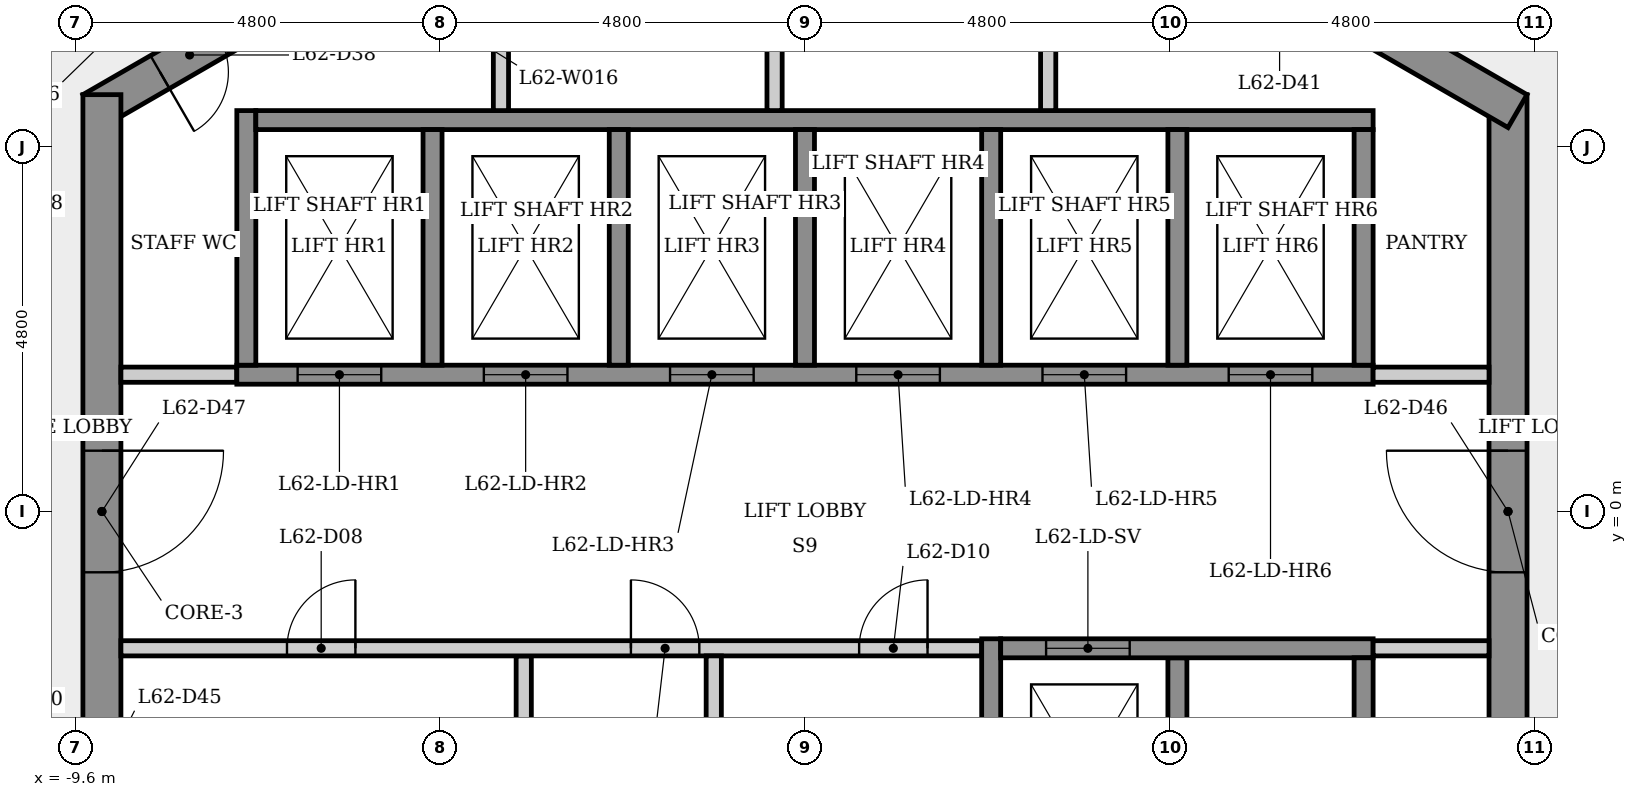
"""IFC4 building model, lengths in metres.
Left out: names, types, materials, properties, quantities, classifications, styles, units other than length and angle.
Written with IfcOpenShell. Run it as: python <this file> out.ifc"""

import sys

from ifc_helpers import new_model, si_unit, direction, frame, frame_2d, origin, place, context, subcontext, project, spatial, rectangle, extrude, element, fill, save


model = new_model("IFC4")
c1 = context("Model", 3, precision=1e-05, world=origin(), true_north=direction((0.0, 1.0)))
c2 = subcontext(c1, "Body", "Model", "MODEL_VIEW")
j1 = project(units=[si_unit("LENGTHUNIT", "METRE"), si_unit("PLANEANGLEUNIT", "RADIAN")], contexts=[c1])
p1 = place(None, origin())
s1 = spatial("IfcSite", under=j1, at=p1, CompositionType="ELEMENT")
p2 = place(p1, origin())
s2 = spatial("IfcBuilding", under=s1, at=p2, CompositionType="ELEMENT")
p3 = place(p2, frame((0.0, 0.0, 232.5)))
s3 = spatial("IfcBuildingStorey", under=s2, at=p3, CompositionType="ELEMENT", Elevation=232.5)
p4 = place(p3, frame((9.25, -5.485, 0.0), z_axis=(0.0, 0.0, 1.0), x_axis=(0.0, 1.0, 0.0)))
e1 = element("IfcWall", 1, at=p4, inside=s3, PredefinedType="SHEAR", context=c2, shape_type="SweptSolid", body=[
    extrude(rectangle(XDim=10.97, YDim=0.5, at=frame_2d((5.485, 0.0))), origin(), (0.0, 0.0, 1.0), 3.4),
])
p5 = place(p4, frame((4.685, 0.0, 0.0)))
e2 = element("IfcOpeningElement", 2, at=p5, cuts=e1, PredefinedType="OPENING", context=c2, shape_type="SweptSolid", body=[
    extrude(rectangle(XDim=1.6, YDim=2.1, at=frame_2d((0.8, 1.05))), frame((0.0, 0.26, 0.0), z_axis=(0.0, -1.0, 0.0), x_axis=(1.0, 0.0, 0.0)), (0.0, 0.0, 1.0), 0.52),
])
p6 = place(p3, frame((9.375, 5.268, 0.0), z_axis=(0.0, 0.0, 1.0), x_axis=(-0.866023993627, 0.500002442456, 0.0)))
e3 = element("IfcWall", 3, at=p6, inside=s3, PredefinedType="SHEAR", context=c2, shape_type="SweptSolid", body=[
    extrude(rectangle(XDim=10.97, YDim=0.5, at=frame_2d((5.485, 0.0))), origin(), (0.0, 0.0, 1.0), 3.4),
])
p7 = place(p6, frame((8.383, 0.0, 0.0)))
e4 = element("IfcOpeningElement", 4, at=p7, cuts=e3, PredefinedType="OPENING", context=c2, shape_type="SweptSolid", body=[
    extrude(rectangle(XDim=0.9, YDim=2.1, at=frame_2d((0.45, 1.05))), frame((0.0, 0.26, 0.0), z_axis=(0.0, -1.0, 0.0), x_axis=(1.0, 0.0, 0.0)), (0.0, 0.0, 1.0), 0.52),
])
p8 = place(p6, frame((3.165, 0.0, 0.0)))
e5 = element("IfcOpeningElement", 5, at=p8, cuts=e3, PredefinedType="OPENING", context=c2, shape_type="SweptSolid", body=[
    extrude(rectangle(XDim=0.9, YDim=2.1, at=frame_2d((0.45, 1.05))), frame((0.0, 0.26, 0.0), z_axis=(0.0, -1.0, 0.0), x_axis=(1.0, 0.0, 0.0)), (0.0, 0.0, 1.0), 0.52),
])
p9 = place(p3, frame((0.125, 10.753, 0.0), z_axis=(0.0, 0.0, 1.0), x_axis=(-0.866023993627, -0.500002442456, 0.0)))
e6 = element("IfcWall", 6, at=p9, inside=s3, PredefinedType="SHEAR", context=c2, shape_type="SweptSolid", body=[
    extrude(rectangle(XDim=10.97, YDim=0.5, at=frame_2d((5.485, 0.0))), origin(), (0.0, 0.0, 1.0), 3.4),
])
p10 = place(p9, frame((9.043, 0.0, 0.0)))
e7 = element("IfcOpeningElement", 7, at=p10, cuts=e6, PredefinedType="OPENING", context=c2, shape_type="SweptSolid", body=[
    extrude(rectangle(XDim=0.9, YDim=2.1, at=frame_2d((0.45, 1.05))), frame((0.0, 0.26, 0.0), z_axis=(0.0, -1.0, 0.0), x_axis=(1.0, 0.0, 0.0)), (0.0, 0.0, 1.0), 0.52),
])
p11 = place(p9, frame((2.38, 0.0, 0.0)))
e8 = element("IfcOpeningElement", 8, at=p11, cuts=e6, PredefinedType="OPENING", context=c2, shape_type="SweptSolid", body=[
    extrude(rectangle(XDim=0.9, YDim=2.1, at=frame_2d((0.45, 1.05))), frame((0.0, 0.26, 0.0), z_axis=(0.0, -1.0, 0.0), x_axis=(1.0, 0.0, 0.0)), (0.0, 0.0, 1.0), 0.52),
])
p12 = place(p3, frame((-9.25, 5.485, 0.0), z_axis=(0.0, 0.0, 1.0), x_axis=(0.0, -1.0, 0.0)))
e9 = element("IfcWall", 9, at=p12, inside=s3, PredefinedType="SHEAR", context=c2, shape_type="SweptSolid", body=[
    extrude(rectangle(XDim=10.97, YDim=0.5, at=frame_2d((5.485, 0.0))), origin(), (0.0, 0.0, 1.0), 3.4),
])
p13 = place(p12, frame((8.51, 0.0, 0.0)))
e10 = element("IfcOpeningElement", 10, at=p13, cuts=e9, PredefinedType="OPENING", context=c2, shape_type="SweptSolid", body=[
    extrude(rectangle(XDim=0.9, YDim=2.1, at=frame_2d((0.45, 1.05))), frame((0.0, 0.26, 0.0), z_axis=(0.0, -1.0, 0.0), x_axis=(1.0, 0.0, 0.0)), (0.0, 0.0, 1.0), 0.52),
])
p14 = place(p12, frame((4.685, 0.0, 0.0)))
e11 = element("IfcOpeningElement", 11, at=p14, cuts=e9, PredefinedType="OPENING", context=c2, shape_type="SweptSolid", body=[
    extrude(rectangle(XDim=1.6, YDim=2.1, at=frame_2d((0.8, 1.05))), frame((0.0, 0.26, 0.0), z_axis=(0.0, -1.0, 0.0), x_axis=(1.0, 0.0, 0.0)), (0.0, 0.0, 1.0), 0.52),
])
p15 = place(p3, frame((-9.0, 1.8, 0.0), z_axis=(0.0, 0.0, 1.0), x_axis=(1.0, 0.0, 0.0)))
e12 = element("IfcWall", 12, at=p15, inside=s3, PredefinedType="PARTITIONING", context=c2, shape_type="SweptSolid", body=[
    extrude(rectangle(XDim=1.525, YDim=0.2, at=frame_2d((0.763, 0.0))), origin(), (0.0, 0.0, 1.0), 3.05),
])
p16 = place(p3, frame((-7.475, 1.8, 0.0), z_axis=(0.0, 0.0, 1.0), x_axis=(1.0, 0.0, 0.0)))
e13 = element("IfcWall", 13, at=p16, inside=s3, PredefinedType="SHEAR", context=c2, shape_type="SweptSolid", body=[
    extrude(rectangle(XDim=14.95, YDim=0.25, at=frame_2d((7.475, 0.0))), origin(), (0.0, 0.0, 1.0), 3.05),
])
p17 = place(p16, frame((0.8, 0.0, 0.0)))
e14 = element("IfcOpeningElement", 14, at=p17, cuts=e13, PredefinedType="OPENING", context=c2, shape_type="SweptSolid", body=[
    extrude(rectangle(XDim=1.1, YDim=2.1, at=frame_2d((0.55, 1.05))), frame((0.0, 0.135, 0.0), z_axis=(0.0, -1.0, 0.0), x_axis=(1.0, 0.0, 0.0)), (0.0, 0.0, 1.0), 0.27),
])
p18 = place(p16, frame((3.25, 0.0, 0.0)))
e15 = element("IfcOpeningElement", 15, at=p18, cuts=e13, PredefinedType="OPENING", context=c2, shape_type="SweptSolid", body=[
    extrude(rectangle(XDim=1.1, YDim=2.1, at=frame_2d((0.55, 1.05))), frame((0.0, 0.135, 0.0), z_axis=(0.0, -1.0, 0.0), x_axis=(1.0, 0.0, 0.0)), (0.0, 0.0, 1.0), 0.27),
])
p19 = place(p16, frame((5.7, 0.0, 0.0)))
e16 = element("IfcOpeningElement", 16, at=p19, cuts=e13, PredefinedType="OPENING", context=c2, shape_type="SweptSolid", body=[
    extrude(rectangle(XDim=1.1, YDim=2.1, at=frame_2d((0.55, 1.05))), frame((0.0, 0.135, 0.0), z_axis=(0.0, -1.0, 0.0), x_axis=(1.0, 0.0, 0.0)), (0.0, 0.0, 1.0), 0.27),
])
p20 = place(p16, frame((8.15, 0.0, 0.0)))
e17 = element("IfcOpeningElement", 17, at=p20, cuts=e13, PredefinedType="OPENING", context=c2, shape_type="SweptSolid", body=[
    extrude(rectangle(XDim=1.1, YDim=2.1, at=frame_2d((0.55, 1.05))), frame((0.0, 0.135, 0.0), z_axis=(0.0, -1.0, 0.0), x_axis=(1.0, 0.0, 0.0)), (0.0, 0.0, 1.0), 0.27),
])
p21 = place(p16, frame((10.6, 0.0, 0.0)))
e18 = element("IfcOpeningElement", 18, at=p21, cuts=e13, PredefinedType="OPENING", context=c2, shape_type="SweptSolid", body=[
    extrude(rectangle(XDim=1.1, YDim=2.1, at=frame_2d((0.55, 1.05))), frame((0.0, 0.135, 0.0), z_axis=(0.0, -1.0, 0.0), x_axis=(1.0, 0.0, 0.0)), (0.0, 0.0, 1.0), 0.27),
])
p22 = place(p16, frame((13.05, 0.0, 0.0)))
e19 = element("IfcOpeningElement", 19, at=p22, cuts=e13, PredefinedType="OPENING", context=c2, shape_type="SweptSolid", body=[
    extrude(rectangle(XDim=1.1, YDim=2.1, at=frame_2d((0.55, 1.05))), frame((0.0, 0.135, 0.0), z_axis=(0.0, -1.0, 0.0), x_axis=(1.0, 0.0, 0.0)), (0.0, 0.0, 1.0), 0.27),
])
p23 = place(p3, frame((-7.35, 1.925, 0.0), z_axis=(0.0, 0.0, 1.0), x_axis=(0.0, 1.0, 0.0)))
e20 = element("IfcWall", 20, at=p23, inside=s3, PredefinedType="SHEAR", context=c2, shape_type="SweptSolid", body=[
    extrude(rectangle(XDim=3.35, YDim=0.25, at=frame_2d((1.675, 0.0))), origin(), (0.0, 0.0, 1.0), 3.05),
])
p24 = place(p3, frame((-7.225, 5.15, 0.0), z_axis=(0.0, 0.0, 1.0), x_axis=(1.0, 0.0, 0.0)))
e21 = element("IfcWall", 21, at=p24, inside=s3, PredefinedType="SHEAR", context=c2, shape_type="SweptSolid", body=[
    extrude(rectangle(XDim=14.7, YDim=0.25, at=frame_2d((7.35, 0.0))), origin(), (0.0, 0.0, 1.0), 3.05),
])
p25 = place(p3, frame((-4.9, 5.025, 0.0), z_axis=(0.0, 0.0, 1.0), x_axis=(0.0, -1.0, 0.0)))
e22 = element("IfcWall", 22, at=p25, inside=s3, PredefinedType="SHEAR", context=c2, shape_type="SweptSolid", body=[
    extrude(rectangle(XDim=3.1, YDim=0.25, at=frame_2d((1.55, 0.0))), origin(), (0.0, 0.0, 1.0), 3.4),
])
p26 = place(p3, frame((-4.0, 8.083, 0.0), z_axis=(0.0, 0.0, 1.0), x_axis=(0.0, -1.0, 0.0)))
e23 = element("IfcWall", 23, at=p26, inside=s3, PredefinedType="PARTITIONING", context=c2, shape_type="SweptSolid", body=[
    extrude(rectangle(XDim=2.808, YDim=0.2, at=frame_2d((1.404, 0.0))), origin(), (0.0, 0.0, 1.0), 3.05),
])
p27 = place(p3, frame((-3.7, -1.9, 0.0), z_axis=(0.0, 0.0, 1.0), x_axis=(0.0, -1.0, 0.0)))
e24 = element("IfcWall", 24, at=p27, inside=s3, PredefinedType="PARTITIONING", context=c2, shape_type="SweptSolid", body=[
    extrude(rectangle(XDim=3.15, YDim=0.2, at=frame_2d((1.575, 0.0))), origin(), (0.0, 0.0, 1.0), 3.05),
])
p28 = place(p3, frame((-9.0, -1.8, 0.0), z_axis=(0.0, 0.0, 1.0), x_axis=(1.0, 0.0, 0.0)))
e25 = element("IfcWall", 25, at=p28, inside=s3, PredefinedType="PARTITIONING", context=c2, shape_type="SweptSolid", body=[
    extrude(rectangle(XDim=11.325, YDim=0.2, at=frame_2d((5.663, 0.0))), origin(), (0.0, 0.0, 1.0), 3.05),
])
p29 = place(p28, frame((2.185, 0.0, 0.0)))
e26 = element("IfcOpeningElement", 26, at=p29, cuts=e25, PredefinedType="OPENING", context=c2, shape_type="SweptSolid", body=[
    extrude(rectangle(XDim=0.9, YDim=2.1, at=frame_2d((0.45, 1.05))), frame((0.0, 0.11, 0.0), z_axis=(0.0, -1.0, 0.0), x_axis=(1.0, 0.0, 0.0)), (0.0, 0.0, 1.0), 0.22),
])
p30 = place(p28, frame((6.71, 0.0, 0.0)))
e27 = element("IfcOpeningElement", 27, at=p30, cuts=e25, PredefinedType="OPENING", context=c2, shape_type="SweptSolid", body=[
    extrude(rectangle(XDim=0.9, YDim=2.1, at=frame_2d((0.45, 1.05))), frame((0.0, 0.11, 0.0), z_axis=(0.0, -1.0, 0.0), x_axis=(1.0, 0.0, 0.0)), (0.0, 0.0, 1.0), 0.22),
])
p31 = place(p28, frame((9.713, 0.0, 0.0)))
e28 = element("IfcOpeningElement", 28, at=p31, cuts=e25, PredefinedType="OPENING", context=c2, shape_type="SweptSolid", body=[
    extrude(rectangle(XDim=0.9, YDim=2.1, at=frame_2d((0.45, 1.05))), frame((0.0, 0.11, 0.0), z_axis=(0.0, -1.0, 0.0), x_axis=(1.0, 0.0, 0.0)), (0.0, 0.0, 1.0), 0.22),
])
p32 = place(p3, frame((-2.45, 5.025, 0.0), z_axis=(0.0, 0.0, 1.0), x_axis=(0.0, -1.0, 0.0)))
e29 = element("IfcWall", 29, at=p32, inside=s3, PredefinedType="SHEAR", context=c2, shape_type="SweptSolid", body=[
    extrude(rectangle(XDim=3.1, YDim=0.25, at=frame_2d((1.55, 0.0))), origin(), (0.0, 0.0, 1.0), 3.4),
])
p33 = place(p3, frame((-1.2, -1.9, 0.0), z_axis=(0.0, 0.0, 1.0), x_axis=(0.0, -1.0, 0.0)))
e30 = element("IfcWall", 30, at=p33, inside=s3, PredefinedType="PARTITIONING", context=c2, shape_type="SweptSolid", body=[
    extrude(rectangle(XDim=3.15, YDim=0.2, at=frame_2d((1.575, 0.0))), origin(), (0.0, 0.0, 1.0), 3.05),
])
p34 = place(p3, frame((-0.4, 10.161, 0.0), z_axis=(0.0, 0.0, 1.0), x_axis=(0.0, -1.0, 0.0)))
e31 = element("IfcWall", 31, at=p34, inside=s3, PredefinedType="PARTITIONING", context=c2, shape_type="SweptSolid", body=[
    extrude(rectangle(XDim=4.886, YDim=0.2, at=frame_2d((2.443, 0.0))), origin(), (0.0, 0.0, 1.0), 3.05),
])
p35 = place(p3, frame((0.0, 5.025, 0.0), z_axis=(0.0, 0.0, 1.0), x_axis=(0.0, -1.0, 0.0)))
e32 = element("IfcWall", 32, at=p35, inside=s3, PredefinedType="SHEAR", context=c2, shape_type="SweptSolid", body=[
    extrude(rectangle(XDim=3.1, YDim=0.25, at=frame_2d((1.55, 0.0))), origin(), (0.0, 0.0, 1.0), 3.4),
])
p36 = place(p3, frame((2.45, -5.275, 0.0), z_axis=(0.0, 0.0, 1.0), x_axis=(0.0, 1.0, 0.0)))
e33 = element("IfcWall", 33, at=p36, inside=s3, PredefinedType="SHEAR", context=c2, shape_type="SweptSolid", body=[
    extrude(rectangle(XDim=3.6, YDim=0.25, at=frame_2d((1.8, 0.0))), origin(), (0.0, 0.0, 1.0), 3.05),
])
p37 = place(p3, frame((2.45, 5.025, 0.0), z_axis=(0.0, 0.0, 1.0), x_axis=(0.0, -1.0, 0.0)))
e34 = element("IfcWall", 34, at=p37, inside=s3, PredefinedType="SHEAR", context=c2, shape_type="SweptSolid", body=[
    extrude(rectangle(XDim=3.1, YDim=0.25, at=frame_2d((1.55, 0.0))), origin(), (0.0, 0.0, 1.0), 3.4),
])
p38 = place(p3, frame((3.2, 8.545, 0.0), z_axis=(0.0, 0.0, 1.0), x_axis=(0.0, -1.0, 0.0)))
e35 = element("IfcWall", 35, at=p38, inside=s3, PredefinedType="PARTITIONING", context=c2, shape_type="SweptSolid", body=[
    extrude(rectangle(XDim=3.27, YDim=0.2, at=frame_2d((1.635, 0.0))), origin(), (0.0, 0.0, 1.0), 3.05),
])
for number, where, z_axis, x_axis in (
    (36, (4.9, -1.925, 0.0), (0.0, 0.0, 1.0), (0.0, -1.0, 0.0)),
    (37, (4.9, 5.025, 0.0), (0.0, 0.0, 1.0), (0.0, -1.0, 0.0)),
):
    element("IfcWall", number, at=place(p3, frame(where, z_axis=z_axis, x_axis=x_axis)), inside=s3, PredefinedType="SHEAR", context=c2, shape_type="SweptSolid", body=[
        extrude(rectangle(XDim=3.1, YDim=0.25, at=frame_2d((1.55, 0.0))), origin(), (0.0, 0.0, 1.0), 3.4),
    ])
p39 = place(p3, frame((2.575, -1.8, 0.0), z_axis=(0.0, 0.0, 1.0), x_axis=(1.0, 0.0, 0.0)))
e38 = element("IfcWall", 38, at=p39, inside=s3, PredefinedType="SHEAR", context=c2, shape_type="SweptSolid", body=[
    extrude(rectangle(XDim=4.9, YDim=0.25, at=frame_2d((2.45, 0.0))), origin(), (0.0, 0.0, 1.0), 3.05),
])
p40 = place(p39, frame((0.597, 0.0, 0.0)))
e39 = element("IfcOpeningElement", 39, at=p40, cuts=e38, PredefinedType="OPENING", context=c2, shape_type="SweptSolid", body=[
    extrude(rectangle(XDim=1.1, YDim=2.1, at=frame_2d((0.55, 1.05))), frame((0.0, 0.135, 0.0), z_axis=(0.0, -1.0, 0.0), x_axis=(1.0, 0.0, 0.0)), (0.0, 0.0, 1.0), 0.27),
])
p41 = place(p3, frame((7.475, 1.8, 0.0), z_axis=(0.0, 0.0, 1.0), x_axis=(1.0, 0.0, 0.0)))
e40 = element("IfcWall", 40, at=p41, inside=s3, PredefinedType="PARTITIONING", context=c2, shape_type="SweptSolid", body=[
    extrude(rectangle(XDim=1.525, YDim=0.2, at=frame_2d((0.763, 0.0))), origin(), (0.0, 0.0, 1.0), 3.05),
])
for number, where, z_axis, x_axis in (
    (41, (7.35, -1.925, 0.0), (0.0, 0.0, 1.0), (0.0, -1.0, 0.0)),
    (42, (7.35, 5.025, 0.0), (0.0, 0.0, 1.0), (0.0, -1.0, 0.0)),
):
    element("IfcWall", number, at=place(p3, frame(where, z_axis=z_axis, x_axis=x_axis)), inside=s3, PredefinedType="SHEAR", context=c2, shape_type="SweptSolid", body=[
        extrude(rectangle(XDim=3.1, YDim=0.25, at=frame_2d((1.55, 0.0))), origin(), (0.0, 0.0, 1.0), 3.4),
    ])
p42 = place(p3, frame((9.0, -1.8, 0.0), z_axis=(0.0, 0.0, 1.0), x_axis=(-1.0, 0.0, 0.0)))
e43 = element("IfcWall", 43, at=p42, inside=s3, PredefinedType="PARTITIONING", context=c2, shape_type="SweptSolid", body=[
    extrude(rectangle(XDim=1.525, YDim=0.2, at=frame_2d((0.763, 0.0))), origin(), (0.0, 0.0, 1.0), 3.05),
])
p43 = place(p17, origin())
e44 = element("IfcDoor", 44, at=p43, inside=s3, OperationType="SLIDING_TO_LEFT", PredefinedType="DOOR", context=c2, shape_type="SweptSolid", body=[
    extrude(rectangle(XDim=1.1, YDim=2.1, at=frame_2d((0.55, 1.05))), frame((0.0, 0.025, 0.0), z_axis=(0.0, -1.0, 0.0), x_axis=(1.0, 0.0, 0.0)), (0.0, 0.0, 1.0), 0.05),
])
fill(e14, e44)
p44 = place(p18, origin())
e45 = element("IfcDoor", 45, at=p44, inside=s3, OperationType="SLIDING_TO_LEFT", PredefinedType="DOOR", context=c2, shape_type="SweptSolid", body=[
    extrude(rectangle(XDim=1.1, YDim=2.1, at=frame_2d((0.55, 1.05))), frame((0.0, 0.025, 0.0), z_axis=(0.0, -1.0, 0.0), x_axis=(1.0, 0.0, 0.0)), (0.0, 0.0, 1.0), 0.05),
])
fill(e15, e45)
p45 = place(p19, origin())
e46 = element("IfcDoor", 46, at=p45, inside=s3, OperationType="SLIDING_TO_LEFT", PredefinedType="DOOR", context=c2, shape_type="SweptSolid", body=[
    extrude(rectangle(XDim=1.1, YDim=2.1, at=frame_2d((0.55, 1.05))), frame((0.0, 0.025, 0.0), z_axis=(0.0, -1.0, 0.0), x_axis=(1.0, 0.0, 0.0)), (0.0, 0.0, 1.0), 0.05),
])
fill(e16, e46)
p46 = place(p20, origin())
e47 = element("IfcDoor", 47, at=p46, inside=s3, OperationType="SLIDING_TO_LEFT", PredefinedType="DOOR", context=c2, shape_type="SweptSolid", body=[
    extrude(rectangle(XDim=1.1, YDim=2.1, at=frame_2d((0.55, 1.05))), frame((0.0, 0.025, 0.0), z_axis=(0.0, -1.0, 0.0), x_axis=(1.0, 0.0, 0.0)), (0.0, 0.0, 1.0), 0.05),
])
fill(e17, e47)
p47 = place(p21, origin())
e48 = element("IfcDoor", 48, at=p47, inside=s3, OperationType="SLIDING_TO_LEFT", PredefinedType="DOOR", context=c2, shape_type="SweptSolid", body=[
    extrude(rectangle(XDim=1.1, YDim=2.1, at=frame_2d((0.55, 1.05))), frame((0.0, 0.025, 0.0), z_axis=(0.0, -1.0, 0.0), x_axis=(1.0, 0.0, 0.0)), (0.0, 0.0, 1.0), 0.05),
])
fill(e18, e48)
p48 = place(p22, origin())
e49 = element("IfcDoor", 49, at=p48, inside=s3, OperationType="SLIDING_TO_LEFT", PredefinedType="DOOR", context=c2, shape_type="SweptSolid", body=[
    extrude(rectangle(XDim=1.1, YDim=2.1, at=frame_2d((0.55, 1.05))), frame((0.0, 0.025, 0.0), z_axis=(0.0, -1.0, 0.0), x_axis=(1.0, 0.0, 0.0)), (0.0, 0.0, 1.0), 0.05),
])
fill(e19, e49)
p49 = place(p40, origin())
e50 = element("IfcDoor", 50, at=p49, inside=s3, OperationType="SLIDING_TO_LEFT", PredefinedType="DOOR", context=c2, shape_type="SweptSolid", body=[
    extrude(rectangle(XDim=1.1, YDim=2.1, at=frame_2d((0.55, 1.05))), frame((0.0, 0.025, 0.0), z_axis=(0.0, -1.0, 0.0), x_axis=(1.0, 0.0, 0.0)), (0.0, 0.0, 1.0), 0.05),
])
fill(e39, e50)
p50 = place(p29, origin())
e51 = element("IfcDoor", 51, at=p50, inside=s3, OperationType="SINGLE_SWING_RIGHT", PredefinedType="DOOR", context=c2, shape_type="SweptSolid", body=[
    extrude(rectangle(XDim=0.9, YDim=2.1, at=frame_2d((0.45, 1.05))), frame((0.0, 0.025, 0.0), z_axis=(0.0, -1.0, 0.0), x_axis=(1.0, 0.0, 0.0)), (0.0, 0.0, 1.0), 0.05),
])
fill(e26, e51)
p51 = place(p30, origin())
e52 = element("IfcDoor", 52, at=p51, inside=s3, OperationType="SINGLE_SWING_LEFT", PredefinedType="DOOR", context=c2, shape_type="SweptSolid", body=[
    extrude(rectangle(XDim=0.9, YDim=2.1, at=frame_2d((0.45, 1.05))), frame((0.0, 0.025, 0.0), z_axis=(0.0, -1.0, 0.0), x_axis=(1.0, 0.0, 0.0)), (0.0, 0.0, 1.0), 0.05),
])
fill(e27, e52)
p52 = place(p31, origin())
e53 = element("IfcDoor", 53, at=p52, inside=s3, OperationType="SINGLE_SWING_RIGHT", PredefinedType="DOOR", context=c2, shape_type="SweptSolid", body=[
    extrude(rectangle(XDim=0.9, YDim=2.1, at=frame_2d((0.45, 1.05))), frame((0.0, 0.025, 0.0), z_axis=(0.0, -1.0, 0.0), x_axis=(1.0, 0.0, 0.0)), (0.0, 0.0, 1.0), 0.05),
])
fill(e28, e53)
p53 = place(p10, origin())
e54 = element("IfcDoor", 54, at=p53, inside=s3, OperationType="SINGLE_SWING_RIGHT", PredefinedType="DOOR", context=c2, shape_type="SweptSolid", body=[
    extrude(rectangle(XDim=0.9, YDim=2.1, at=frame_2d((0.45, 1.05))), frame((0.0, 0.025, 0.0), z_axis=(0.0, -1.0, 0.0), x_axis=(1.0, 0.0, 0.0)), (0.0, 0.0, 1.0), 0.05),
])
fill(e7, e54)
p54 = place(p5, origin())
e55 = element("IfcDoor", 55, at=p54, inside=s3, OperationType="SINGLE_SWING_RIGHT", PredefinedType="DOOR", context=c2, shape_type="SweptSolid", body=[
    extrude(rectangle(XDim=1.6, YDim=2.1, at=frame_2d((0.8, 1.05))), frame((0.0, 0.025, 0.0), z_axis=(0.0, -1.0, 0.0), x_axis=(1.0, 0.0, 0.0)), (0.0, 0.0, 1.0), 0.05),
])
fill(e2, e55)
p55 = place(p14, origin())
e56 = element("IfcDoor", 56, at=p55, inside=s3, OperationType="SINGLE_SWING_LEFT", PredefinedType="DOOR", context=c2, shape_type="SweptSolid", body=[
    extrude(rectangle(XDim=1.6, YDim=2.1, at=frame_2d((0.8, 1.05))), frame((0.0, 0.025, 0.0), z_axis=(0.0, -1.0, 0.0), x_axis=(1.0, 0.0, 0.0)), (0.0, 0.0, 1.0), 0.05),
])
fill(e11, e56)
save(model, sys.argv[1])
